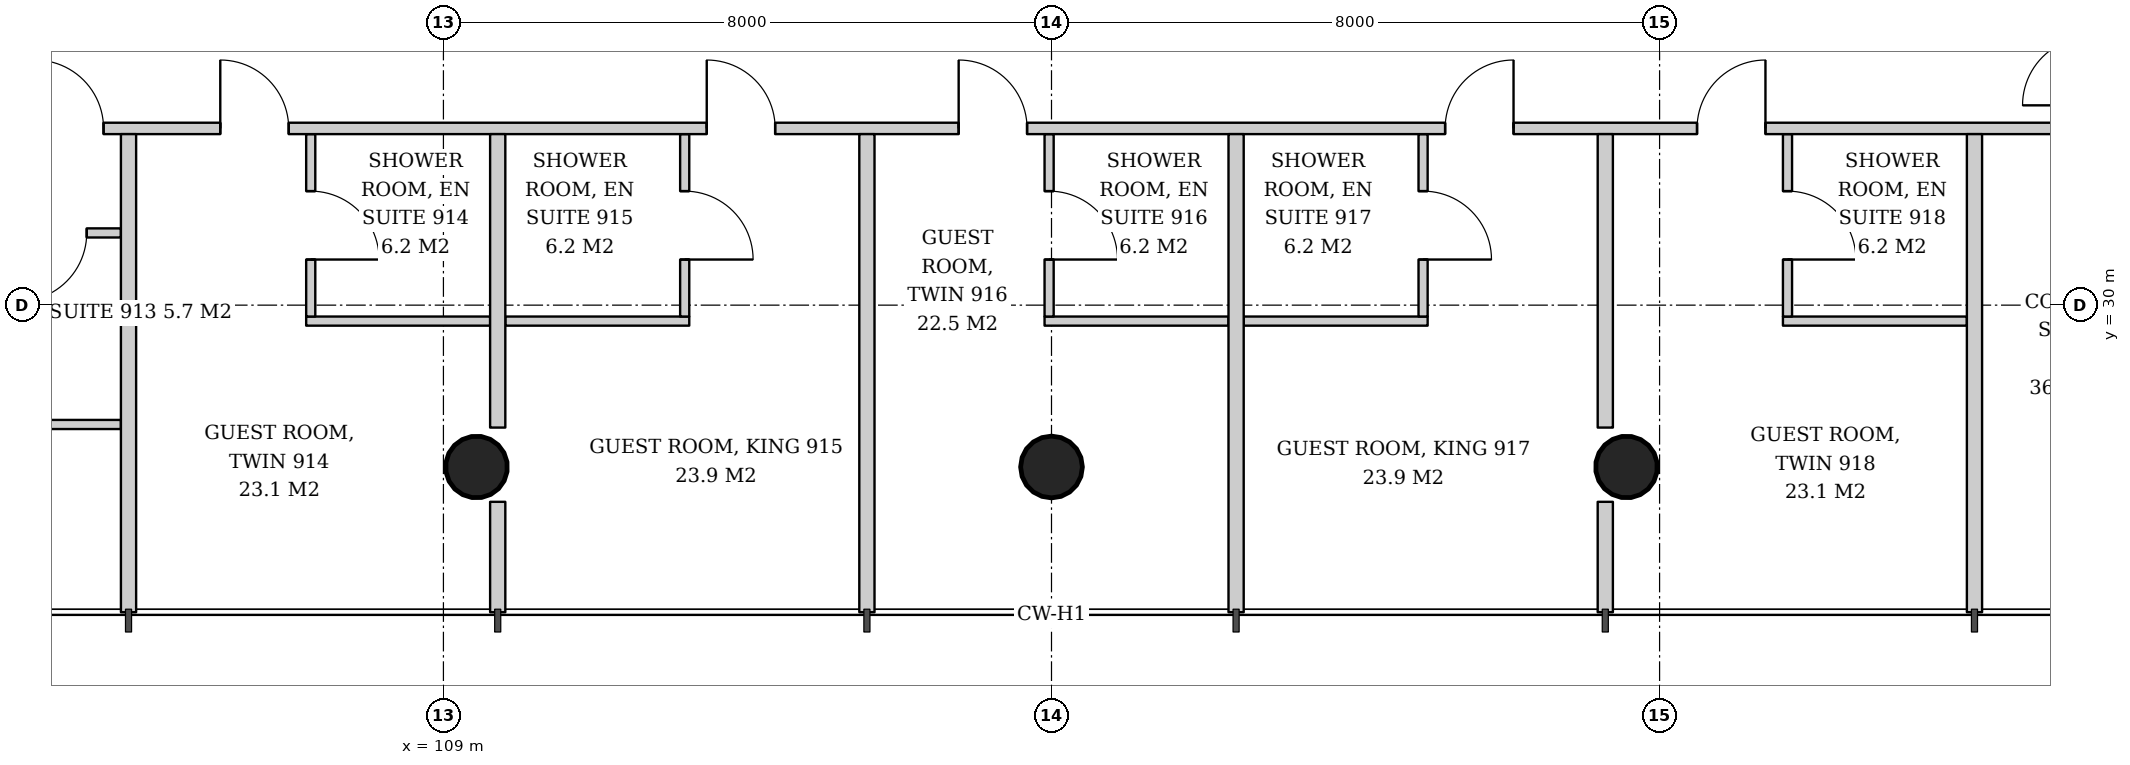
"""IFC4 building model, lengths in metres.
Left out: names, types, materials, properties, quantities, classifications, styles, units other than length and angle.
Written with IfcOpenShell. Run it as: python <this file> out.ifc"""

import sys

from ifc_helpers import new_model, si_unit, direction, frame, frame_2d, origin, origin_2d, place, context, subcontext, project, spatial, rectangle, hollow_circle, extrude, element, fill, save


model = new_model("IFC4")
c1 = context("Model", 3, precision=1e-05, world=origin(), true_north=direction((0.0, 1.0)))
c2 = subcontext(c1, "Body", "Model", "MODEL_VIEW")
j1 = project(units=[si_unit("LENGTHUNIT", "METRE"), si_unit("PLANEANGLEUNIT", "RADIAN")], contexts=[c1])
p1 = place(None, origin())
s1 = spatial("IfcSite", under=j1, at=p1, CompositionType="ELEMENT")
p2 = place(p1, origin())
s2 = spatial("IfcBuilding", under=s1, at=p2, CompositionType="ELEMENT")
p3 = place(p2, frame((0.0, 0.0, 40.0)))
s3 = spatial("IfcBuildingStorey", under=s2, at=p3, CompositionType="ELEMENT", Elevation=40.0)
p4 = place(p3, frame((109.409, 27.819, 0.0), z_axis=(0.021561848751, 0.043059525333, 0.998839808957), x_axis=(-0.894160516368, 0.44774654769, 0.0)))
e1 = element("IfcColumn", 1, at=p4, inside=s3, PredefinedType="COLUMN", context=c2, shape_type="SweptSolid", body=[
    extrude(hollow_circle(Radius=0.406, WallThickness=0.03, at=origin_2d()), origin(), (0.0, 0.0, 1.0), 3.804),
])
p5 = place(p3, frame((117.0, 27.819, 0.0), z_axis=(0.0, 0.043069538298, 0.999072076915), x_axis=(-1.0, 0.0, 0.0)))
e2 = element("IfcColumn", 2, at=p5, inside=s3, PredefinedType="COLUMN", context=c2, shape_type="SweptSolid", body=[
    extrude(hollow_circle(Radius=0.406, WallThickness=0.03, at=origin_2d()), origin(), (0.0, 0.0, 1.0), 3.803),
])
p6 = place(p3, frame((124.591, 27.819, 0.0), z_axis=(-0.021561848751, 0.043059525333, 0.998839808957), x_axis=(-0.894160516368, -0.44774654769, 0.0)))
e3 = element("IfcColumn", 3, at=p6, inside=s3, PredefinedType="COLUMN", context=c2, shape_type="SweptSolid", body=[
    extrude(hollow_circle(Radius=0.406, WallThickness=0.03, at=origin_2d()), origin(), (0.0, 0.0, 1.0), 3.804),
])
p7 = place(p3, frame((104.757, 30.95, 0.0), z_axis=(0.0, 0.0, 1.0), x_axis=(-1.0, 0.0, 0.0)))
e4 = element("IfcWall", 4, at=p7, inside=s3, PredefinedType="PARTITIONING", context=c2, shape_type="SweptSolid", body=[
    extrude(rectangle(XDim=1.757, YDim=0.12, at=frame_2d((0.878, 0.0))), origin(), (0.0, 0.0, 1.0), 3.6),
])
p8 = place(p7, frame((0.45, 0.0, 0.0)))
e5 = element("IfcOpeningElement", 5, at=p8, cuts=e4, PredefinedType="OPENING", context=c2, shape_type="SweptSolid", body=[
    extrude(rectangle(XDim=0.9, YDim=2.1, at=frame_2d((0.45, 1.05))), frame((0.0, 0.07, 0.0), z_axis=(0.0, -1.0, 0.0), x_axis=(1.0, 0.0, 0.0)), (0.0, 0.0, 1.0), 0.14),
])
p9 = place(p3, frame((104.757, 28.43, 0.0), z_axis=(0.0, 0.0, 1.0), x_axis=(-1.0, 0.0, 0.0)))
e6 = element("IfcWall", 6, at=p9, inside=s3, PredefinedType="PARTITIONING", context=c2, shape_type="SweptSolid", body=[
    extrude(rectangle(XDim=2.368, YDim=0.12, at=frame_2d((1.184, 0.0))), origin(), (0.0, 0.0, 1.0), 3.6),
])
p10 = place(p3, frame((107.194, 29.79, 0.0), z_axis=(0.0, 0.0, 1.0), x_axis=(1.0, 0.0, 0.0)))
e7 = element("IfcWall", 7, at=p10, inside=s3, PredefinedType="PARTITIONING", context=c2, shape_type="SweptSolid", body=[
    extrude(rectangle(XDim=2.42, YDim=0.12, at=frame_2d((1.21, 0.0))), origin(), (0.0, 0.0, 1.0), 2.8),
])
p11 = place(p3, frame((107.254, 32.25, 0.0), z_axis=(0.0, 0.0, 1.0), x_axis=(0.0, -1.0, 0.0)))
e8 = element("IfcWall", 8, at=p11, inside=s3, PredefinedType="PARTITIONING", context=c2, shape_type="SweptSolid", body=[
    extrude(rectangle(XDim=2.4, YDim=0.12, at=frame_2d((1.2, 0.0))), origin(), (0.0, 0.0, 1.0), 3.6),
])
p12 = place(p11, frame((0.75, 0.0, 0.0)))
e9 = element("IfcOpeningElement", 9, at=p12, cuts=e8, PredefinedType="OPENING", context=c2, shape_type="SweptSolid", body=[
    extrude(rectangle(XDim=0.9, YDim=2.1, at=frame_2d((0.45, 1.05))), frame((0.0, 0.07, 0.0), z_axis=(0.0, -1.0, 0.0), x_axis=(1.0, 0.0, 0.0)), (0.0, 0.0, 1.0), 0.14),
])
p13 = place(p3, frame((109.814, 29.79, 0.0), z_axis=(0.0, 0.0, 1.0), x_axis=(1.0, 0.0, 0.0)))
e10 = element("IfcWall", 10, at=p13, inside=s3, PredefinedType="PARTITIONING", context=c2, shape_type="SweptSolid", body=[
    extrude(rectangle(XDim=2.42, YDim=0.12, at=frame_2d((1.21, 0.0))), origin(), (0.0, 0.0, 1.0), 2.847),
])
p14 = place(p3, frame((112.174, 32.25, 0.0), z_axis=(0.0, 0.0, 1.0), x_axis=(0.0, -1.0, 0.0)))
e11 = element("IfcWall", 11, at=p14, inside=s3, PredefinedType="PARTITIONING", context=c2, shape_type="SweptSolid", body=[
    extrude(rectangle(XDim=2.4, YDim=0.12, at=frame_2d((1.2, 0.0))), origin(), (0.0, 0.0, 1.0), 2.847),
])
p15 = place(p14, frame((0.75, 0.0, 0.0)))
e12 = element("IfcOpeningElement", 12, at=p15, cuts=e11, PredefinedType="OPENING", context=c2, shape_type="SweptSolid", body=[
    extrude(rectangle(XDim=0.9, YDim=2.1, at=frame_2d((0.45, 1.05))), frame((0.0, 0.07, 0.0), z_axis=(0.0, -1.0, 0.0), x_axis=(1.0, 0.0, 0.0)), (0.0, 0.0, 1.0), 0.14),
])
p16 = place(p3, frame((116.909, 29.79, 0.0), z_axis=(0.0, 0.0, 1.0), x_axis=(1.0, 0.0, 0.0)))
e13 = element("IfcWall", 13, at=p16, inside=s3, PredefinedType="PARTITIONING", context=c2, shape_type="SweptSolid", body=[
    extrude(rectangle(XDim=2.42, YDim=0.12, at=frame_2d((1.21, 0.0))), origin(), (0.0, 0.0, 1.0), 2.847),
])
p17 = place(p3, frame((116.969, 32.25, 0.0), z_axis=(0.0, 0.0, 1.0), x_axis=(0.0, -1.0, 0.0)))
e14 = element("IfcWall", 14, at=p17, inside=s3, PredefinedType="PARTITIONING", context=c2, shape_type="SweptSolid", body=[
    extrude(rectangle(XDim=2.4, YDim=0.12, at=frame_2d((1.2, 0.0))), origin(), (0.0, 0.0, 1.0), 2.847),
])
p18 = place(p17, frame((0.75, 0.0, 0.0)))
e15 = element("IfcOpeningElement", 15, at=p18, cuts=e14, PredefinedType="OPENING", context=c2, shape_type="SweptSolid", body=[
    extrude(rectangle(XDim=0.9, YDim=2.1, at=frame_2d((0.45, 1.05))), frame((0.0, 0.07, 0.0), z_axis=(0.0, -1.0, 0.0), x_axis=(1.0, 0.0, 0.0)), (0.0, 0.0, 1.0), 0.14),
])
p19 = place(p3, frame((119.529, 29.79, 0.0), z_axis=(0.0, 0.0, 1.0), x_axis=(1.0, 0.0, 0.0)))
e16 = element("IfcWall", 16, at=p19, inside=s3, PredefinedType="PARTITIONING", context=c2, shape_type="SweptSolid", body=[
    extrude(rectangle(XDim=2.42, YDim=0.12, at=frame_2d((1.21, 0.0))), origin(), (0.0, 0.0, 1.0), 2.847),
])
p20 = place(p3, frame((121.889, 32.25, 0.0), z_axis=(0.0, 0.0, 1.0), x_axis=(0.0, -1.0, 0.0)))
e17 = element("IfcWall", 17, at=p20, inside=s3, PredefinedType="PARTITIONING", context=c2, shape_type="SweptSolid", body=[
    extrude(rectangle(XDim=2.4, YDim=0.12, at=frame_2d((1.2, 0.0))), origin(), (0.0, 0.0, 1.0), 3.6),
])
p21 = place(p20, frame((0.75, 0.0, 0.0)))
e18 = element("IfcOpeningElement", 18, at=p21, cuts=e17, PredefinedType="OPENING", context=c2, shape_type="SweptSolid", body=[
    extrude(rectangle(XDim=0.9, YDim=2.1, at=frame_2d((0.45, 1.05))), frame((0.0, 0.07, 0.0), z_axis=(0.0, -1.0, 0.0), x_axis=(1.0, 0.0, 0.0)), (0.0, 0.0, 1.0), 0.14),
])
p22 = place(p3, frame((126.623, 29.79, 0.0), z_axis=(0.0, 0.0, 1.0), x_axis=(1.0, 0.0, 0.0)))
e19 = element("IfcWall", 19, at=p22, inside=s3, PredefinedType="PARTITIONING", context=c2, shape_type="SweptSolid", body=[
    extrude(rectangle(XDim=2.42, YDim=0.12, at=frame_2d((1.21, 0.0))), origin(), (0.0, 0.0, 1.0), 3.6),
])
p23 = place(p3, frame((126.683, 32.25, 0.0), z_axis=(0.0, 0.0, 1.0), x_axis=(0.0, -1.0, 0.0)))
e20 = element("IfcWall", 20, at=p23, inside=s3, PredefinedType="PARTITIONING", context=c2, shape_type="SweptSolid", body=[
    extrude(rectangle(XDim=2.4, YDim=0.12, at=frame_2d((1.2, 0.0))), origin(), (0.0, 0.0, 1.0), 3.6),
])
p24 = place(p23, frame((0.75, 0.0, 0.0)))
e21 = element("IfcOpeningElement", 21, at=p24, cuts=e20, PredefinedType="OPENING", context=c2, shape_type="SweptSolid", body=[
    extrude(rectangle(XDim=0.9, YDim=2.1, at=frame_2d((0.45, 1.05))), frame((0.0, 0.07, 0.0), z_axis=(0.0, -1.0, 0.0), x_axis=(1.0, 0.0, 0.0)), (0.0, 0.0, 1.0), 0.14),
])
p25 = place(p3, frame((102.706, 32.325, 0.0), z_axis=(0.0, 0.0, 1.0), x_axis=(1.0, 0.0, 0.0)))
e22 = element("IfcWall", 22, at=p25, inside=s3, PredefinedType="PARTITIONING", context=c2, shape_type="SweptSolid", body=[
    extrude(rectangle(XDim=28.589, YDim=0.15, at=frame_2d((14.294, 0.0))), origin(), (0.0, 0.0, 1.0), 2.8),
])
p26 = place(p25, frame((0.923, 0.0, 0.0)))
e23 = element("IfcOpeningElement", 23, at=p26, cuts=e22, PredefinedType="OPENING", context=c2, shape_type="SweptSolid", body=[
    extrude(rectangle(XDim=0.9, YDim=2.1, at=frame_2d((0.45, 1.05))), frame((0.0, 0.085, 0.0), z_axis=(0.0, -1.0, 0.0), x_axis=(1.0, 0.0, 0.0)), (0.0, 0.0, 1.0), 0.17),
])
p27 = place(p25, frame((3.359, 0.0, 0.0)))
e24 = element("IfcOpeningElement", 24, at=p27, cuts=e22, PredefinedType="OPENING", context=c2, shape_type="SweptSolid", body=[
    extrude(rectangle(XDim=0.9, YDim=2.1, at=frame_2d((0.45, 1.05))), frame((0.0, 0.085, 0.0), z_axis=(0.0, -1.0, 0.0), x_axis=(1.0, 0.0, 0.0)), (0.0, 0.0, 1.0), 0.17),
])
p28 = place(p25, frame((9.759, 0.0, 0.0)))
e25 = element("IfcOpeningElement", 25, at=p28, cuts=e22, PredefinedType="OPENING", context=c2, shape_type="SweptSolid", body=[
    extrude(rectangle(XDim=0.9, YDim=2.1, at=frame_2d((0.45, 1.05))), frame((0.0, 0.085, 0.0), z_axis=(0.0, -1.0, 0.0), x_axis=(1.0, 0.0, 0.0)), (0.0, 0.0, 1.0), 0.17),
])
p29 = place(p25, frame((13.073, 0.0, 0.0)))
e26 = element("IfcOpeningElement", 26, at=p29, cuts=e22, PredefinedType="OPENING", context=c2, shape_type="SweptSolid", body=[
    extrude(rectangle(XDim=0.9, YDim=2.1, at=frame_2d((0.45, 1.05))), frame((0.0, 0.085, 0.0), z_axis=(0.0, -1.0, 0.0), x_axis=(1.0, 0.0, 0.0)), (0.0, 0.0, 1.0), 0.17),
])
p30 = place(p25, frame((19.473, 0.0, 0.0)))
e27 = element("IfcOpeningElement", 27, at=p30, cuts=e22, PredefinedType="OPENING", context=c2, shape_type="SweptSolid", body=[
    extrude(rectangle(XDim=0.9, YDim=2.1, at=frame_2d((0.45, 1.05))), frame((0.0, 0.085, 0.0), z_axis=(0.0, -1.0, 0.0), x_axis=(1.0, 0.0, 0.0)), (0.0, 0.0, 1.0), 0.17),
])
p31 = place(p25, frame((22.787, 0.0, 0.0)))
e28 = element("IfcOpeningElement", 28, at=p31, cuts=e22, PredefinedType="OPENING", context=c2, shape_type="SweptSolid", body=[
    extrude(rectangle(XDim=0.9, YDim=2.1, at=frame_2d((0.45, 1.05))), frame((0.0, 0.085, 0.0), z_axis=(0.0, -1.0, 0.0), x_axis=(1.0, 0.0, 0.0)), (0.0, 0.0, 1.0), 0.17),
])
p32 = place(p3, frame((104.857, 32.25, 0.0), z_axis=(0.0, 0.0, 1.0), x_axis=(0.0, -1.0, 0.0)))
e29 = element("IfcWall", 29, at=p32, inside=s3, PredefinedType="PARTITIONING", context=c2, shape_type="SweptSolid", body=[
    extrude(rectangle(XDim=6.29, YDim=0.2, at=frame_2d((3.145, 0.0))), origin(), (0.0, 0.0, 1.0), 3.05),
])
p33 = place(p3, frame((109.714, 32.25, 0.0), z_axis=(0.0, 0.0, 1.0), x_axis=(0.0, -1.0, 0.0)))
e30 = element("IfcWall", 30, at=p33, inside=s3, PredefinedType="PARTITIONING", context=c2, shape_type="SweptSolid", body=[
    extrude(rectangle(XDim=3.861, YDim=0.2, at=frame_2d((1.93, 0.0))), origin(), (0.0, 0.0, 1.0), 3.6),
])
p34 = place(p3, frame((109.714, 27.412, 0.0), z_axis=(0.0, 0.0, 1.0), x_axis=(0.0, -1.0, 0.0)))
e31 = element("IfcWall", 31, at=p34, inside=s3, PredefinedType="PARTITIONING", context=c2, shape_type="SweptSolid", body=[
    extrude(rectangle(XDim=1.452, YDim=0.2, at=frame_2d((0.726, 0.0))), origin(), (0.0, 0.0, 1.0), 3.6),
])
for number, where, z_axis, x_axis in (
    (32, (114.572, 32.25, 0.0), (0.0, 0.0, 1.0), (0.0, -1.0, 0.0)),
    (33, (119.428, 32.25, 0.0), (0.0, 0.0, 1.0), (0.0, -1.0, 0.0)),
):
    element("IfcWall", number, at=place(p3, frame(where, z_axis=z_axis, x_axis=x_axis)), inside=s3, PredefinedType="PARTITIONING", context=c2, shape_type="SweptSolid", body=[
        extrude(rectangle(XDim=6.29, YDim=0.2, at=frame_2d((3.145, 0.0))), origin(), (0.0, 0.0, 1.0), 3.05),
    ])
p35 = place(p3, frame((124.286, 32.25, 0.0), z_axis=(0.0, 0.0, 1.0), x_axis=(0.0, -1.0, 0.0)))
e34 = element("IfcWall", 34, at=p35, inside=s3, PredefinedType="PARTITIONING", context=c2, shape_type="SweptSolid", body=[
    extrude(rectangle(XDim=3.861, YDim=0.2, at=frame_2d((1.93, 0.0))), origin(), (0.0, 0.0, 1.0), 3.6),
])
p36 = place(p3, frame((124.286, 27.412, 0.0), z_axis=(0.0, 0.0, 1.0), x_axis=(0.0, -1.0, 0.0)))
e35 = element("IfcWall", 35, at=p36, inside=s3, PredefinedType="PARTITIONING", context=c2, shape_type="SweptSolid", body=[
    extrude(rectangle(XDim=1.452, YDim=0.2, at=frame_2d((0.726, 0.0))), origin(), (0.0, 0.0, 1.0), 3.6),
])
p37 = place(p3, frame((129.143, 32.25, 0.0), z_axis=(0.0, 0.0, 1.0), x_axis=(0.0, -1.0, 0.0)))
e36 = element("IfcWall", 36, at=p37, inside=s3, PredefinedType="PARTITIONING", context=c2, shape_type="SweptSolid", body=[
    extrude(rectangle(XDim=6.29, YDim=0.2, at=frame_2d((3.145, 0.0))), origin(), (0.0, 0.0, 1.0), 3.05),
])
p38 = place(p8, origin())
e37 = element("IfcDoor", 37, at=p38, inside=s3, OperationType="SINGLE_SWING_RIGHT", PredefinedType="DOOR", context=c2, shape_type="SweptSolid", body=[
    extrude(rectangle(XDim=0.9, YDim=2.1, at=frame_2d((0.45, 1.05))), frame((0.0, 0.025, 0.0), z_axis=(0.0, -1.0, 0.0), x_axis=(1.0, 0.0, 0.0)), (0.0, 0.0, 1.0), 0.05),
])
fill(e5, e37)
p39 = place(p12, origin())
e38 = element("IfcDoor", 38, at=p39, inside=s3, OperationType="SINGLE_SWING_RIGHT", PredefinedType="DOOR", context=c2, shape_type="SweptSolid", body=[
    extrude(rectangle(XDim=0.9, YDim=2.1, at=frame_2d((0.45, 1.05))), frame((0.0, 0.025, 0.0), z_axis=(0.0, -1.0, 0.0), x_axis=(1.0, 0.0, 0.0)), (0.0, 0.0, 1.0), 0.05),
])
fill(e9, e38)
p40 = place(p15, origin())
e39 = element("IfcDoor", 39, at=p40, inside=s3, OperationType="SINGLE_SWING_RIGHT", PredefinedType="DOOR", context=c2, shape_type="SweptSolid", body=[
    extrude(rectangle(XDim=0.9, YDim=2.1, at=frame_2d((0.45, 1.05))), frame((0.0, 0.025, 0.0), z_axis=(0.0, -1.0, 0.0), x_axis=(1.0, 0.0, 0.0)), (0.0, 0.0, 1.0), 0.05),
])
fill(e12, e39)
p41 = place(p18, origin())
e40 = element("IfcDoor", 40, at=p41, inside=s3, OperationType="SINGLE_SWING_RIGHT", PredefinedType="DOOR", context=c2, shape_type="SweptSolid", body=[
    extrude(rectangle(XDim=0.9, YDim=2.1, at=frame_2d((0.45, 1.05))), frame((0.0, 0.025, 0.0), z_axis=(0.0, -1.0, 0.0), x_axis=(1.0, 0.0, 0.0)), (0.0, 0.0, 1.0), 0.05),
])
fill(e15, e40)
p42 = place(p21, origin())
e41 = element("IfcDoor", 41, at=p42, inside=s3, OperationType="SINGLE_SWING_RIGHT", PredefinedType="DOOR", context=c2, shape_type="SweptSolid", body=[
    extrude(rectangle(XDim=0.9, YDim=2.1, at=frame_2d((0.45, 1.05))), frame((0.0, 0.025, 0.0), z_axis=(0.0, -1.0, 0.0), x_axis=(1.0, 0.0, 0.0)), (0.0, 0.0, 1.0), 0.05),
])
fill(e18, e41)
p43 = place(p24, origin())
e42 = element("IfcDoor", 42, at=p43, inside=s3, OperationType="SINGLE_SWING_RIGHT", PredefinedType="DOOR", context=c2, shape_type="SweptSolid", body=[
    extrude(rectangle(XDim=0.9, YDim=2.1, at=frame_2d((0.45, 1.05))), frame((0.0, 0.025, 0.0), z_axis=(0.0, -1.0, 0.0), x_axis=(1.0, 0.0, 0.0)), (0.0, 0.0, 1.0), 0.05),
])
fill(e21, e42)
p44 = place(p26, origin())
e43 = element("IfcDoor", 43, at=p44, inside=s3, OperationType="SINGLE_SWING_LEFT", PredefinedType="DOOR", context=c2, shape_type="SweptSolid", body=[
    extrude(rectangle(XDim=0.9, YDim=2.1, at=frame_2d((0.45, 1.05))), frame((0.0, 0.025, 0.0), z_axis=(0.0, -1.0, 0.0), x_axis=(1.0, 0.0, 0.0)), (0.0, 0.0, 1.0), 0.05),
])
fill(e23, e43)
p45 = place(p27, origin())
e44 = element("IfcDoor", 44, at=p45, inside=s3, OperationType="SINGLE_SWING_LEFT", PredefinedType="DOOR", context=c2, shape_type="SweptSolid", body=[
    extrude(rectangle(XDim=0.9, YDim=2.1, at=frame_2d((0.45, 1.05))), frame((0.0, 0.025, 0.0), z_axis=(0.0, -1.0, 0.0), x_axis=(1.0, 0.0, 0.0)), (0.0, 0.0, 1.0), 0.05),
])
fill(e24, e44)
p46 = place(p28, origin())
e45 = element("IfcDoor", 45, at=p46, inside=s3, OperationType="SINGLE_SWING_LEFT", PredefinedType="DOOR", context=c2, shape_type="SweptSolid", body=[
    extrude(rectangle(XDim=0.9, YDim=2.1, at=frame_2d((0.45, 1.05))), frame((0.0, 0.025, 0.0), z_axis=(0.0, -1.0, 0.0), x_axis=(1.0, 0.0, 0.0)), (0.0, 0.0, 1.0), 0.05),
])
fill(e25, e45)
p47 = place(p29, origin())
e46 = element("IfcDoor", 46, at=p47, inside=s3, OperationType="SINGLE_SWING_LEFT", PredefinedType="DOOR", context=c2, shape_type="SweptSolid", body=[
    extrude(rectangle(XDim=0.9, YDim=2.1, at=frame_2d((0.45, 1.05))), frame((0.0, 0.025, 0.0), z_axis=(0.0, -1.0, 0.0), x_axis=(1.0, 0.0, 0.0)), (0.0, 0.0, 1.0), 0.05),
])
fill(e26, e46)
p48 = place(p30, origin())
e47 = element("IfcDoor", 47, at=p48, inside=s3, OperationType="SINGLE_SWING_RIGHT", PredefinedType="DOOR", context=c2, shape_type="SweptSolid", body=[
    extrude(rectangle(XDim=0.9, YDim=2.1, at=frame_2d((0.45, 1.05))), frame((0.0, 0.025, 0.0), z_axis=(0.0, -1.0, 0.0), x_axis=(1.0, 0.0, 0.0)), (0.0, 0.0, 1.0), 0.05),
])
fill(e27, e47)
p49 = place(p31, origin())
e48 = element("IfcDoor", 48, at=p49, inside=s3, OperationType="SINGLE_SWING_RIGHT", PredefinedType="DOOR", context=c2, shape_type="SweptSolid", body=[
    extrude(rectangle(XDim=0.9, YDim=2.1, at=frame_2d((0.45, 1.05))), frame((0.0, 0.025, 0.0), z_axis=(0.0, -1.0, 0.0), x_axis=(1.0, 0.0, 0.0)), (0.0, 0.0, 1.0), 0.05),
])
fill(e28, e48)
save(model, sys.argv[1])
